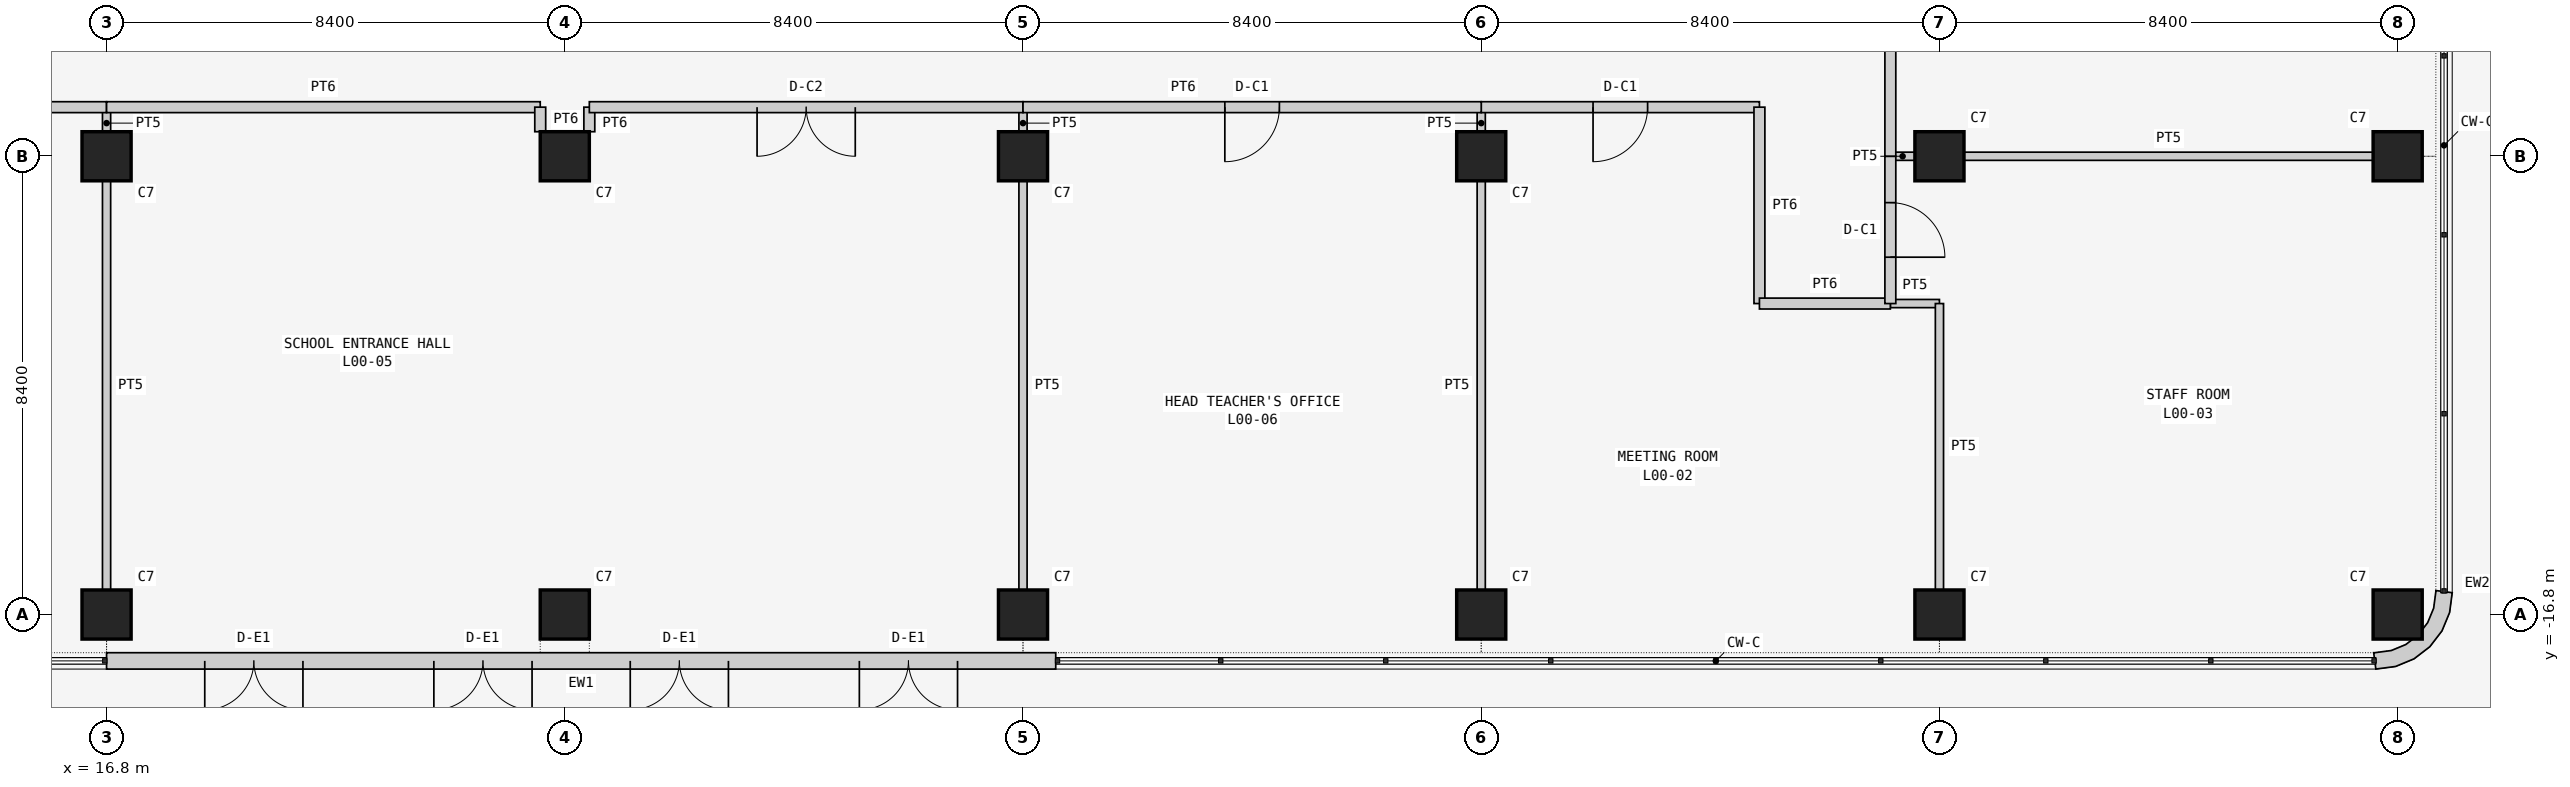
"""IFC4 building model, lengths in metres.
Left out: names, types, materials, properties, quantities, classifications, styles, units other than length and angle.
Written with IfcOpenShell. Run it as: python <this file> out.ifc"""

import sys

from ifc_helpers import new_model, si_unit, direction, frame, frame_2d, origin, origin_2d, place, context, subcontext, project, spatial, polyline, rectangle, outline, extrude, element, fill, save


model = new_model("IFC4")
c1 = context("Model", 3, precision=1e-05, world=origin(), true_north=direction((0.0, 1.0)))
c2 = subcontext(c1, "Body", "Model", "MODEL_VIEW")
j1 = project(units=[si_unit("LENGTHUNIT", "METRE"), si_unit("PLANEANGLEUNIT", "RADIAN")], contexts=[c1])
p1 = place(None, origin())
s1 = spatial("IfcSite", under=j1, at=p1, CompositionType="ELEMENT")
p2 = place(p1, origin())
s2 = spatial("IfcBuilding", under=s1, at=p2, CompositionType="ELEMENT")
p3 = place(p2, origin())
s3 = spatial("IfcBuildingStorey", under=s2, at=p3, CompositionType="ELEMENT", Elevation=0.0)
for number, where, z_axis, x_axis in (
    (1, (16.8, -16.8, 0.0), (0.0, 0.0, 1.0), (1.0, 0.0, 0.0)),
    (2, (16.8, -8.4, 0.0), (0.0, 0.0, 1.0), (1.0, 0.0, 0.0)),
    (3, (25.2, -16.8, 0.0), (0.0, 0.0, 1.0), (1.0, 0.0, 0.0)),
    (4, (25.2, -8.4, 0.0), (0.0, 0.0, 1.0), (1.0, 0.0, 0.0)),
    (5, (33.6, -16.8, 0.0), (0.0, 0.0, 1.0), (1.0, 0.0, 0.0)),
    (6, (33.6, -8.4, 0.0), (0.0, 0.0, 1.0), (1.0, 0.0, 0.0)),
    (7, (42.0, -16.8, 0.0), (0.0, 0.0, 1.0), (1.0, 0.0, 0.0)),
    (8, (42.0, -8.4, 0.0), (0.0, 0.0, 1.0), (1.0, 0.0, 0.0)),
    (9, (50.4, -16.8, 0.0), (0.0, 0.0, 1.0), (1.0, 0.0, 0.0)),
    (10, (50.4, -8.4, 0.0), (0.0, 0.0, 1.0), (1.0, 0.0, 0.0)),
    (11, (58.8, -16.8, 0.0), (0.0, 0.0, 1.0), (1.0, 0.0, 0.0)),
    (12, (58.8, -8.4, 0.0), (0.0, 0.0, 1.0), (1.0, 0.0, 0.0)),
):
    element("IfcColumn", number, at=place(p3, frame(where, z_axis=z_axis, x_axis=x_axis)), inside=s3, PredefinedType="COLUMN", context=c2, shape_type="SweptSolid", body=[
        extrude(rectangle(XDim=0.9, YDim=0.9, at=origin_2d()), origin(), (0.0, 0.0, 1.0), 6.0),
    ])
p4 = place(p3, frame((16.8, -17.65, 0.0), z_axis=(0.0, 0.0, 1.0), x_axis=(1.0, 0.0, 0.0)))
e13 = element("IfcWall", 13, at=p4, inside=s3, PredefinedType="SOLIDWALL", context=c2, shape_type="SweptSolid", body=[
    extrude(rectangle(XDim=17.4, YDim=0.3, at=frame_2d((8.7, 0.0))), origin(), (0.0, 0.0, 1.0), 5.8),
])
p5 = place(p4, frame((1.8, 0.0, 0.0)))
e14 = element("IfcOpeningElement", 14, at=p5, cuts=e13, PredefinedType="OPENING", context=c2, shape_type="SweptSolid", body=[
    extrude(rectangle(XDim=1.8, YDim=2.4, at=frame_2d((0.9, 1.2))), frame((0.0, 0.16, 0.0), z_axis=(0.0, -1.0, 0.0), x_axis=(1.0, 0.0, 0.0)), (0.0, 0.0, 1.0), 0.32),
])
p6 = place(p4, frame((6.0, 0.0, 0.0)))
e15 = element("IfcOpeningElement", 15, at=p6, cuts=e13, PredefinedType="OPENING", context=c2, shape_type="SweptSolid", body=[
    extrude(rectangle(XDim=1.8, YDim=2.4, at=frame_2d((0.9, 1.2))), frame((0.0, 0.16, 0.0), z_axis=(0.0, -1.0, 0.0), x_axis=(1.0, 0.0, 0.0)), (0.0, 0.0, 1.0), 0.32),
])
p7 = place(p4, frame((9.6, 0.0, 0.0)))
e16 = element("IfcOpeningElement", 16, at=p7, cuts=e13, PredefinedType="OPENING", context=c2, shape_type="SweptSolid", body=[
    extrude(rectangle(XDim=1.8, YDim=2.4, at=frame_2d((0.9, 1.2))), frame((0.0, 0.16, 0.0), z_axis=(0.0, -1.0, 0.0), x_axis=(1.0, 0.0, 0.0)), (0.0, 0.0, 1.0), 0.32),
])
p8 = place(p4, frame((13.8, 0.0, 0.0)))
e17 = element("IfcOpeningElement", 17, at=p8, cuts=e13, PredefinedType="OPENING", context=c2, shape_type="SweptSolid", body=[
    extrude(rectangle(XDim=1.8, YDim=2.4, at=frame_2d((0.9, 1.2))), frame((0.0, 0.16, 0.0), z_axis=(0.0, -1.0, 0.0), x_axis=(1.0, 0.0, 0.0)), (0.0, 0.0, 1.0), 0.32),
])
p9 = place(p3, frame((58.355, -17.648, 0.0), z_axis=(0.0, 0.0, 1.0), x_axis=(0.707106781187, -0.707106781187, 0.0)))
e18 = element("IfcWall", 18, at=p9, inside=s3, PredefinedType="SOLIDWALL", context=c2, shape_type="SweptSolid", body=[
    extrude(outline(polyline([(0.139, 1.904), (-0.101, 1.72), (-0.087, 1.706), (0.1, 1.463), (0.209, 1.198), (0.246, 0.914), (0.209, 0.63), (0.1, 0.365), (-0.087, 0.122), (-0.101, 0.108), (0.139, -0.076), (0.362, 0.214), (0.502, 0.552), (0.549, 0.914), (0.502, 1.276), (0.362, 1.614), (0.139, 1.904)])), origin(), (0.0, 0.0, 1.0), 5.8),
])
p10 = place(p3, frame((16.8, -8.85, 0.0), z_axis=(0.0, 0.0, 1.0), x_axis=(0.0, -1.0, 0.0)))
e19 = element("IfcWall", 19, at=p10, inside=s3, PredefinedType="PARTITIONING", context=c2, shape_type="SweptSolid", body=[
    extrude(rectangle(XDim=7.5, YDim=0.15, at=frame_2d((3.75, 0.0))), origin(), (0.0, 0.0, 1.0), 5.043),
])
p11 = place(p3, frame((16.8, -7.5, 0.0), z_axis=(0.0, 0.0, 1.0), x_axis=(0.0, -1.0, 0.0)))
e20 = element("IfcWall", 20, at=p11, inside=s3, PredefinedType="PARTITIONING", context=c2, shape_type="SweptSolid", body=[
    extrude(rectangle(XDim=0.45, YDim=0.15, at=frame_2d((0.225, 0.0))), origin(), (0.0, 0.0, 1.0), 5.043),
])
p12 = place(p3, frame((11.7, -7.5, 0.0), z_axis=(0.0, 0.0, 1.0), x_axis=(1.0, 0.0, 0.0)))
e21 = element("IfcWall", 21, at=p12, inside=s3, PredefinedType="PARTITIONING", context=c2, shape_type="SweptSolid", body=[
    extrude(rectangle(XDim=5.1, YDim=0.2, at=frame_2d((2.55, 0.0))), origin(), (0.0, 0.0, 1.0), 5.8),
])
p13 = place(p12, frame((2.05, 0.0, 0.0)))
e22 = element("IfcOpeningElement", 22, at=p13, cuts=e21, PredefinedType="OPENING", context=c2, shape_type="SweptSolid", body=[
    extrude(rectangle(XDim=1.0, YDim=2.1, at=frame_2d((0.5, 1.05))), frame((0.0, 0.11, 0.0), z_axis=(0.0, -1.0, 0.0), x_axis=(1.0, 0.0, 0.0)), (0.0, 0.0, 1.0), 0.22),
])
p14 = place(p3, frame((49.5, -11.1, 0.0), z_axis=(0.0, 0.0, 1.0), x_axis=(1.0, 0.0, 0.0)))
e23 = element("IfcWall", 23, at=p14, inside=s3, PredefinedType="PARTITIONING", context=c2, shape_type="SweptSolid", body=[
    extrude(rectangle(XDim=0.9, YDim=0.15, at=frame_2d((0.45, 0.0))), origin(), (0.0, 0.0, 1.0), 5.8),
])
p15 = place(p3, frame((50.4, -11.1, 0.0), z_axis=(0.0, 0.0, 1.0), x_axis=(0.0, -1.0, 0.0)))
e24 = element("IfcWall", 24, at=p15, inside=s3, PredefinedType="PARTITIONING", context=c2, shape_type="SweptSolid", body=[
    extrude(rectangle(XDim=5.25, YDim=0.15, at=frame_2d((2.625, 0.0))), origin(), (0.0, 0.0, 1.0), 5.043),
])
p16 = place(p3, frame((42.0, -16.35, 0.0), z_axis=(0.0, 0.0, 1.0), x_axis=(0.0, 1.0, 0.0)))
e25 = element("IfcWall", 25, at=p16, inside=s3, PredefinedType="PARTITIONING", context=c2, shape_type="SweptSolid", body=[
    extrude(rectangle(XDim=7.5, YDim=0.15, at=frame_2d((3.75, 0.0))), origin(), (0.0, 0.0, 1.0), 5.043),
])
p17 = place(p3, frame((42.0, -7.95, 0.0), z_axis=(0.0, 0.0, 1.0), x_axis=(0.0, 1.0, 0.0)))
e26 = element("IfcWall", 26, at=p17, inside=s3, PredefinedType="PARTITIONING", context=c2, shape_type="SweptSolid", body=[
    extrude(rectangle(XDim=0.45, YDim=0.15, at=frame_2d((0.225, 0.0))), origin(), (0.0, 0.0, 1.0), 5.043),
])
p18 = place(p3, frame((42.0, -7.5, 0.0), z_axis=(0.0, 0.0, 1.0), x_axis=(1.0, 0.0, 0.0)))
e27 = element("IfcWall", 27, at=p18, inside=s3, PredefinedType="PARTITIONING", context=c2, shape_type="SweptSolid", body=[
    extrude(rectangle(XDim=5.1, YDim=0.2, at=frame_2d((2.55, 0.0))), origin(), (0.0, 0.0, 1.0), 5.8),
])
p19 = place(p18, frame((2.05, 0.0, 0.0)))
e28 = element("IfcOpeningElement", 28, at=p19, cuts=e27, PredefinedType="OPENING", context=c2, shape_type="SweptSolid", body=[
    extrude(rectangle(XDim=1.0, YDim=2.1, at=frame_2d((0.5, 1.05))), frame((0.0, 0.11, 0.0), z_axis=(0.0, -1.0, 0.0), x_axis=(1.0, 0.0, 0.0)), (0.0, 0.0, 1.0), 0.22),
])
p20 = place(p3, frame((47.1, -7.5, 0.0), z_axis=(0.0, 0.0, 1.0), x_axis=(0.0, -1.0, 0.0)))
e29 = element("IfcWall", 29, at=p20, inside=s3, PredefinedType="PARTITIONING", context=c2, shape_type="SweptSolid", body=[
    extrude(rectangle(XDim=3.6, YDim=0.2, at=frame_2d((1.8, 0.0))), origin(), (0.0, 0.0, 1.0), 5.8),
])
p21 = place(p3, frame((47.1, -11.1, 0.0), z_axis=(0.0, 0.0, 1.0), x_axis=(1.0, 0.0, 0.0)))
e30 = element("IfcWall", 30, at=p21, inside=s3, PredefinedType="PARTITIONING", context=c2, shape_type="SweptSolid", body=[
    extrude(rectangle(XDim=2.4, YDim=0.2, at=frame_2d((1.2, 0.0))), origin(), (0.0, 0.0, 1.0), 5.8),
])
p22 = place(p3, frame((49.5, -8.4, 0.0), z_axis=(0.0, 0.0, 1.0), x_axis=(1.0, 0.0, 0.0)))
e31 = element("IfcWall", 31, at=p22, inside=s3, PredefinedType="PARTITIONING", context=c2, shape_type="SweptSolid", body=[
    extrude(rectangle(XDim=0.45, YDim=0.15, at=frame_2d((0.225, 0.0))), origin(), (0.0, 0.0, 1.0), 5.043),
])
p23 = place(p3, frame((50.85, -8.4, 0.0), z_axis=(0.0, 0.0, 1.0), x_axis=(1.0, 0.0, 0.0)))
e32 = element("IfcWall", 32, at=p23, inside=s3, PredefinedType="PARTITIONING", context=c2, shape_type="SweptSolid", body=[
    extrude(rectangle(XDim=7.5, YDim=0.15, at=frame_2d((3.75, 0.0))), origin(), (0.0, 0.0, 1.0), 5.043),
])
p24 = place(p3, frame((49.5, -11.1, 0.0), z_axis=(0.0, 0.0, 1.0), x_axis=(0.0, 1.0, 0.0)))
e33 = element("IfcWall", 33, at=p24, inside=s3, PredefinedType="PARTITIONING", context=c2, shape_type="SweptSolid", body=[
    extrude(rectangle(XDim=2.7, YDim=0.2, at=frame_2d((1.35, 0.0))), origin(), (0.0, 0.0, 1.0), 5.8),
])
p25 = place(p24, frame((0.85, 0.0, 0.0)))
e34 = element("IfcOpeningElement", 34, at=p25, cuts=e33, PredefinedType="OPENING", context=c2, shape_type="SweptSolid", body=[
    extrude(rectangle(XDim=1.0, YDim=2.1, at=frame_2d((0.5, 1.05))), frame((0.0, 0.11, 0.0), z_axis=(0.0, -1.0, 0.0), x_axis=(1.0, 0.0, 0.0)), (0.0, 0.0, 1.0), 0.22),
])
p26 = place(p3, frame((33.6, -8.85, 0.0), z_axis=(0.0, 0.0, 1.0), x_axis=(0.0, -1.0, 0.0)))
e35 = element("IfcWall", 35, at=p26, inside=s3, PredefinedType="PARTITIONING", context=c2, shape_type="SweptSolid", body=[
    extrude(rectangle(XDim=7.5, YDim=0.15, at=frame_2d((3.75, 0.0))), origin(), (0.0, 0.0, 1.0), 5.043),
])
p27 = place(p3, frame((33.6, -7.5, 0.0), z_axis=(0.0, 0.0, 1.0), x_axis=(0.0, -1.0, 0.0)))
e36 = element("IfcWall", 36, at=p27, inside=s3, PredefinedType="PARTITIONING", context=c2, shape_type="SweptSolid", body=[
    extrude(rectangle(XDim=0.45, YDim=0.15, at=frame_2d((0.225, 0.0))), origin(), (0.0, 0.0, 1.0), 5.043),
])
p28 = place(p3, frame((16.8, -7.5, 0.0), z_axis=(0.0, 0.0, 1.0), x_axis=(1.0, 0.0, 0.0)))
e37 = element("IfcWall", 37, at=p28, inside=s3, PredefinedType="PARTITIONING", context=c2, shape_type="SweptSolid", body=[
    extrude(rectangle(XDim=7.95, YDim=0.2, at=frame_2d((3.975, 0.0))), origin(), (0.0, 0.0, 1.0), 5.8),
])
for number, where, z_axis, x_axis in (
    (38, (24.75, -7.5, 0.0), (0.0, 0.0, 1.0), (0.0, -1.0, 0.0)),
    (39, (25.65, -7.95, 0.0), (0.0, 0.0, 1.0), (0.0, 1.0, 0.0)),
):
    element("IfcWall", number, at=place(p3, frame(where, z_axis=z_axis, x_axis=x_axis)), inside=s3, PredefinedType="PARTITIONING", context=c2, shape_type="SweptSolid", body=[
        extrude(rectangle(XDim=0.45, YDim=0.2, at=frame_2d((0.225, 0.0))), origin(), (0.0, 0.0, 1.0), 5.8),
    ])
p29 = place(p3, frame((25.65, -7.5, 0.0), z_axis=(0.0, 0.0, 1.0), x_axis=(1.0, 0.0, 0.0)))
e40 = element("IfcWall", 40, at=p29, inside=s3, PredefinedType="PARTITIONING", context=c2, shape_type="SweptSolid", body=[
    extrude(rectangle(XDim=7.95, YDim=0.2, at=frame_2d((3.975, 0.0))), origin(), (0.0, 0.0, 1.0), 5.8),
])
p30 = place(p29, frame((3.075, 0.0, 0.0)))
e41 = element("IfcOpeningElement", 41, at=p30, cuts=e40, PredefinedType="OPENING", context=c2, shape_type="SweptSolid", body=[
    extrude(rectangle(XDim=1.8, YDim=2.4, at=frame_2d((0.9, 1.2))), frame((0.0, 0.11, 0.0), z_axis=(0.0, -1.0, 0.0), x_axis=(1.0, 0.0, 0.0)), (0.0, 0.0, 1.0), 0.22),
])
p31 = place(p3, frame((33.6, -7.5, 0.0), z_axis=(0.0, 0.0, 1.0), x_axis=(1.0, 0.0, 0.0)))
e42 = element("IfcWall", 42, at=p31, inside=s3, PredefinedType="PARTITIONING", context=c2, shape_type="SweptSolid", body=[
    extrude(rectangle(XDim=8.4, YDim=0.2, at=frame_2d((4.2, 0.0))), origin(), (0.0, 0.0, 1.0), 5.8),
])
p32 = place(p31, frame((3.7, 0.0, 0.0)))
e43 = element("IfcOpeningElement", 43, at=p32, cuts=e42, PredefinedType="OPENING", context=c2, shape_type="SweptSolid", body=[
    extrude(rectangle(XDim=1.0, YDim=2.1, at=frame_2d((0.5, 1.05))), frame((0.0, 0.11, 0.0), z_axis=(0.0, -1.0, 0.0), x_axis=(1.0, 0.0, 0.0)), (0.0, 0.0, 1.0), 0.22),
])
p33 = place(p3, frame((49.5, -8.4, 0.0), z_axis=(0.0, 0.0, 1.0), x_axis=(0.0, 1.0, 0.0)))
e44 = element("IfcWall", 44, at=p33, inside=s3, PredefinedType="PARTITIONING", context=c2, shape_type="SweptSolid", body=[
    extrude(rectangle(XDim=8.4, YDim=0.2, at=frame_2d((4.2, 0.0))), origin(), (0.0, 0.0, 1.0), 5.8),
])
p34 = place(p33, frame((3.7, 0.0, 0.0)))
e45 = element("IfcOpeningElement", 45, at=p34, cuts=e44, PredefinedType="OPENING", context=c2, shape_type="SweptSolid", body=[
    extrude(rectangle(XDim=1.0, YDim=2.1, at=frame_2d((0.5, 1.05))), frame((0.0, 0.11, 0.0), z_axis=(0.0, -1.0, 0.0), x_axis=(1.0, 0.0, 0.0)), (0.0, 0.0, 1.0), 0.22),
])
p35 = place(p5, frame((1.8, 0.0, 0.0), z_axis=(0.0, 0.0, 1.0), x_axis=(-1.0, 0.0, 0.0)))
e46 = element("IfcDoor", 46, at=p35, inside=s3, OperationType="DOUBLE_DOOR_SINGLE_SWING", PredefinedType="DOOR", context=c2, shape_type="SweptSolid", body=[
    extrude(rectangle(XDim=1.8, YDim=2.4, at=frame_2d((0.9, 1.2))), frame((0.0, 0.025, 0.0), z_axis=(0.0, -1.0, 0.0), x_axis=(1.0, 0.0, 0.0)), (0.0, 0.0, 1.0), 0.05),
])
fill(e14, e46)
p36 = place(p6, frame((1.8, 0.0, 0.0), z_axis=(0.0, 0.0, 1.0), x_axis=(-1.0, 0.0, 0.0)))
e47 = element("IfcDoor", 47, at=p36, inside=s3, OperationType="DOUBLE_DOOR_SINGLE_SWING", PredefinedType="DOOR", context=c2, shape_type="SweptSolid", body=[
    extrude(rectangle(XDim=1.8, YDim=2.4, at=frame_2d((0.9, 1.2))), frame((0.0, 0.025, 0.0), z_axis=(0.0, -1.0, 0.0), x_axis=(1.0, 0.0, 0.0)), (0.0, 0.0, 1.0), 0.05),
])
fill(e15, e47)
p37 = place(p7, frame((1.8, 0.0, 0.0), z_axis=(0.0, 0.0, 1.0), x_axis=(-1.0, 0.0, 0.0)))
e48 = element("IfcDoor", 48, at=p37, inside=s3, OperationType="DOUBLE_DOOR_SINGLE_SWING", PredefinedType="DOOR", context=c2, shape_type="SweptSolid", body=[
    extrude(rectangle(XDim=1.8, YDim=2.4, at=frame_2d((0.9, 1.2))), frame((0.0, 0.025, 0.0), z_axis=(0.0, -1.0, 0.0), x_axis=(1.0, 0.0, 0.0)), (0.0, 0.0, 1.0), 0.05),
])
fill(e16, e48)
p38 = place(p8, frame((1.8, 0.0, 0.0), z_axis=(0.0, 0.0, 1.0), x_axis=(-1.0, 0.0, 0.0)))
e49 = element("IfcDoor", 49, at=p38, inside=s3, OperationType="DOUBLE_DOOR_SINGLE_SWING", PredefinedType="DOOR", context=c2, shape_type="SweptSolid", body=[
    extrude(rectangle(XDim=1.8, YDim=2.4, at=frame_2d((0.9, 1.2))), frame((0.0, 0.025, 0.0), z_axis=(0.0, -1.0, 0.0), x_axis=(1.0, 0.0, 0.0)), (0.0, 0.0, 1.0), 0.05),
])
fill(e17, e49)
p39 = place(p19, frame((1.0, 0.0, 0.0), z_axis=(0.0, 0.0, 1.0), x_axis=(-1.0, 0.0, 0.0)))
e50 = element("IfcDoor", 50, at=p39, inside=s3, OperationType="SINGLE_SWING_RIGHT", PredefinedType="DOOR", context=c2, shape_type="SweptSolid", body=[
    extrude(rectangle(XDim=1.0, YDim=2.1, at=frame_2d((0.5, 1.05))), frame((0.0, 0.025, 0.0), z_axis=(0.0, -1.0, 0.0), x_axis=(1.0, 0.0, 0.0)), (0.0, 0.0, 1.0), 0.05),
])
fill(e28, e50)
p40 = place(p25, frame((1.0, 0.0, 0.0), z_axis=(0.0, 0.0, 1.0), x_axis=(-1.0, 0.0, 0.0)))
e51 = element("IfcDoor", 51, at=p40, inside=s3, OperationType="SINGLE_SWING_RIGHT", PredefinedType="DOOR", context=c2, shape_type="SweptSolid", body=[
    extrude(rectangle(XDim=1.0, YDim=2.1, at=frame_2d((0.5, 1.05))), frame((0.0, 0.025, 0.0), z_axis=(0.0, -1.0, 0.0), x_axis=(1.0, 0.0, 0.0)), (0.0, 0.0, 1.0), 0.05),
])
fill(e34, e51)
p41 = place(p30, frame((1.8, 0.0, 0.0), z_axis=(0.0, 0.0, 1.0), x_axis=(-1.0, 0.0, 0.0)))
e52 = element("IfcDoor", 52, at=p41, inside=s3, OperationType="DOUBLE_DOOR_SINGLE_SWING", PredefinedType="DOOR", context=c2, shape_type="SweptSolid", body=[
    extrude(rectangle(XDim=1.8, YDim=2.4, at=frame_2d((0.9, 1.2))), frame((0.0, 0.025, 0.0), z_axis=(0.0, -1.0, 0.0), x_axis=(1.0, 0.0, 0.0)), (0.0, 0.0, 1.0), 0.05),
])
fill(e41, e52)
p42 = place(p32, frame((1.0, 0.0, 0.0), z_axis=(0.0, 0.0, 1.0), x_axis=(-1.0, 0.0, 0.0)))
e53 = element("IfcDoor", 53, at=p42, inside=s3, OperationType="SINGLE_SWING_RIGHT", PredefinedType="DOOR", context=c2, shape_type="SweptSolid", body=[
    extrude(rectangle(XDim=1.0, YDim=2.1, at=frame_2d((0.5, 1.05))), frame((0.0, 0.025, 0.0), z_axis=(0.0, -1.0, 0.0), x_axis=(1.0, 0.0, 0.0)), (0.0, 0.0, 1.0), 0.05),
])
fill(e43, e53)
save(model, sys.argv[1])
